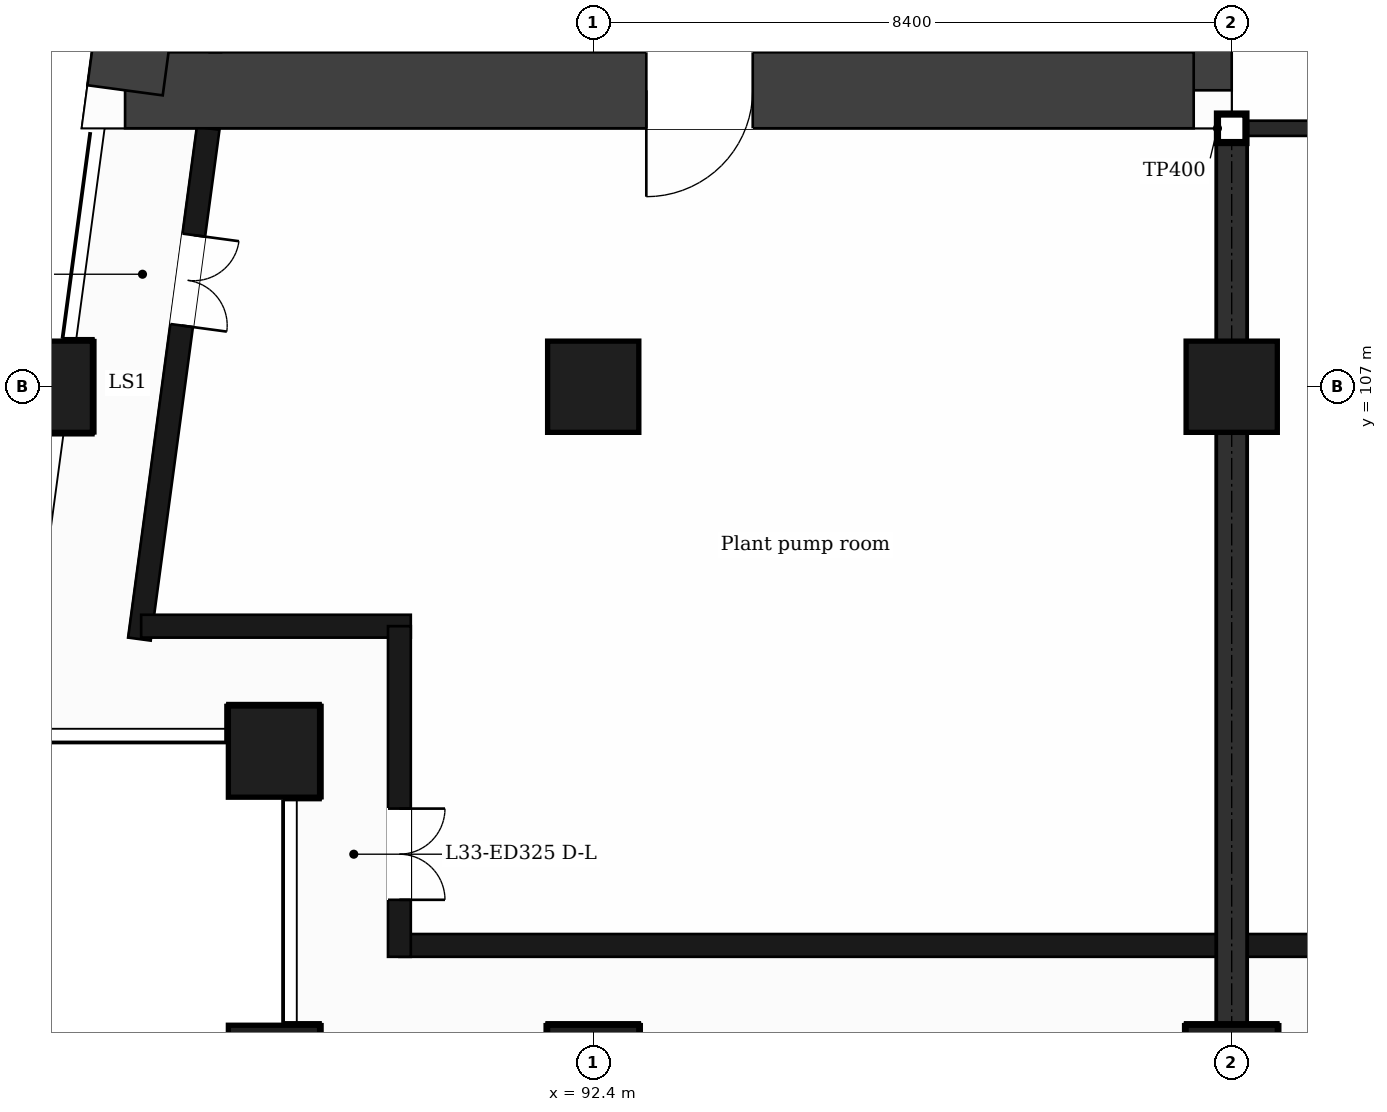
"""IFC4 building model, lengths in metres.
Left out: names, types, materials, properties, quantities, classifications, styles, units other than length and angle.
Written with IfcOpenShell. Run it as: python <this file> out.ifc"""

import sys

from ifc_helpers import new_model, si_unit, direction, frame, frame_2d, origin, origin_2d, place, context, subcontext, project, spatial, rectangle, extrude, element, fill, save


model = new_model("IFC4")
c1 = context("Model", 3, precision=1e-05, world=origin(), true_north=direction((0.0, 1.0)))
c2 = subcontext(c1, "Body", "Model", "MODEL_VIEW")
j1 = project(units=[si_unit("LENGTHUNIT", "METRE"), si_unit("PLANEANGLEUNIT", "RADIAN")], contexts=[c1])
p1 = place(None, origin())
s1 = spatial("IfcSite", under=j1, at=p1, CompositionType="ELEMENT")
p2 = place(p1, origin())
s2 = spatial("IfcBuilding", under=s1, at=p2, CompositionType="ELEMENT")
p3 = place(p2, frame((0.0, 0.0, 142.8)))
s3 = spatial("IfcBuildingStorey", under=s2, at=p3, CompositionType="ELEMENT", Elevation=142.8)
p4 = place(p3, frame((100.3, 131.9, 0.0), z_axis=(0.0, 0.0, 1.0), x_axis=(0.0, -1.0, 0.0)))
e1 = element("IfcWall", 1, at=p4, inside=s3, PredefinedType="SHEAR", context=c2, shape_type="SweptSolid", body=[
    extrude(rectangle(XDim=21.0, YDim=1.0, at=frame_2d((10.5, 0.0))), origin(), (0.0, 0.0, 1.0), 5.0),
])
p5 = place(p4, frame((18.7, 0.0, 0.0)))
e2 = element("IfcOpeningElement", 2, at=p5, cuts=e1, PredefinedType="OPENING", context=c2, shape_type="SweptSolid", body=[
    extrude(rectangle(XDim=1.2, YDim=2.1, at=frame_2d((0.6, 1.05))), frame((0.0, 0.51, 0.0), z_axis=(0.0, -1.0, 0.0), x_axis=(1.0, 0.0, 0.0)), (0.0, 0.0, 1.0), 1.02),
])
p6 = place(p4, frame((7.75, 0.0, 0.0)))
e3 = element("IfcOpeningElement", 3, at=p6, cuts=e1, PredefinedType="OPENING", context=c2, shape_type="SweptSolid", body=[
    extrude(rectangle(XDim=1.4, YDim=2.1, at=frame_2d((0.7, 1.05))), frame((0.0, 0.51, 0.0), z_axis=(0.0, -1.0, 0.0), x_axis=(1.0, 0.0, 0.0)), (0.0, 0.0, 1.0), 1.02),
])
p7 = place(p3, frame((100.3, 110.9, 0.0), z_axis=(0.0, 0.0, 1.0), x_axis=(-1.0, 0.0, 0.0)))
e4 = element("IfcWall", 4, at=p7, inside=s3, PredefinedType="SHEAR", context=c2, shape_type="SweptSolid", body=[
    extrude(rectangle(XDim=14.059, YDim=1.0, at=frame_2d((7.03, 0.0))), origin(), (0.0, 0.0, 1.0), 5.0),
])
p8 = place(p7, frame((5.802, 0.0, 0.0)))
e5 = element("IfcOpeningElement", 5, at=p8, cuts=e4, PredefinedType="OPENING", context=c2, shape_type="SweptSolid", body=[
    extrude(rectangle(XDim=1.4, YDim=2.1, at=frame_2d((0.7, 1.05))), frame((0.0, 0.51, 0.0), z_axis=(0.0, -1.0, 0.0), x_axis=(1.0, 0.0, 0.0)), (0.0, 0.0, 1.0), 1.02),
])
p9 = place(p3, frame((86.241, 110.9, 0.0), z_axis=(0.0, 0.0, 1.0), x_axis=(0.133411141623, 0.991060778808, 0.0)))
e6 = element("IfcWall", 6, at=p9, inside=s3, PredefinedType="SHEAR", context=c2, shape_type="SweptSolid", body=[
    extrude(rectangle(XDim=21.189, YDim=1.0, at=frame_2d((10.595, 0.0))), origin(), (0.0, 0.0, 1.0), 5.0),
])
for number, where, z_axis, x_axis in (
    (7, (92.4, 98.0, 0.0), (0.0, 0.0, 1.0), (1.0, 0.0, 0.0)),
    (8, (100.8, 98.0, 0.0), (0.0, 0.0, 1.0), (1.0, 0.0, 0.0)),
    (9, (88.2, 98.0, 0.0), (0.0, 0.0, 1.0), (1.0, 0.0, 0.0)),
    (10, (88.2, 102.2, 0.0), (0.0, 0.0, 1.0), (1.0, 0.0, 0.0)),
    (11, (92.4, 107.0, 0.0), (0.0, 0.0, 1.0), (1.0, 0.0, 0.0)),
    (12, (100.8, 107.0, 0.0), (0.0, 0.0, 1.0), (1.0, 0.0, 0.0)),
    (13, (85.211, 107.0, 0.0), (0.0, 0.0, 1.0), (1.0, 0.0, 0.0)),
):
    element("IfcColumn", number, at=place(p3, frame(where, z_axis=z_axis, x_axis=x_axis)), inside=s3, PredefinedType="COLUMN", context=c2, shape_type="SweptSolid", body=[
        extrude(rectangle(XDim=1.2, YDim=1.2, at=origin_2d()), origin(), (0.0, 0.0, 1.0), 5.0),
    ])
p10 = place(p3, frame((89.85, 99.65, 0.0), z_axis=(0.0, 0.0, 1.0), x_axis=(1.0, 0.0, 0.0)))
e14 = element("IfcWall", 14, at=p10, inside=s3, PredefinedType="SOLIDWALL", context=c2, shape_type="SweptSolid", body=[
    extrude(rectangle(XDim=47.25, YDim=0.3, at=frame_2d((23.625, 0.0))), origin(), (0.0, 0.0, 1.0), 4.68),
])
p11 = place(p10, frame((25.05, 0.0, 0.0)))
e15 = element("IfcOpeningElement", 15, at=p11, cuts=e14, PredefinedType="OPENING", context=c2, shape_type="SweptSolid", body=[
    extrude(rectangle(XDim=1.2, YDim=2.4, at=frame_2d((0.6, 1.2))), frame((0.0, 0.16, 0.0), z_axis=(0.0, -1.0, 0.0), x_axis=(1.0, 0.0, 0.0)), (0.0, 0.0, 1.0), 0.32),
])
p12 = place(p3, frame((87.334, 110.4, 0.0), z_axis=(0.0, 0.0, 1.0), x_axis=(-0.133437175554, -0.991057273915, 0.0)))
e16 = element("IfcWall", 16, at=p12, inside=s3, PredefinedType="SOLIDWALL", context=c2, shape_type="SweptSolid", body=[
    extrude(rectangle(XDim=6.781, YDim=0.3, at=frame_2d((3.39, 0.0))), origin(), (0.0, 0.0, 1.0), 4.68),
])
p13 = place(p12, frame((1.418, 0.0, 0.0)))
e17 = element("IfcOpeningElement", 17, at=p13, cuts=e16, PredefinedType="OPENING", context=c2, shape_type="SweptSolid", body=[
    extrude(rectangle(XDim=1.2, YDim=2.4, at=frame_2d((0.6, 1.2))), frame((0.0, 0.16, 0.0), z_axis=(0.0, -1.0, 0.0), x_axis=(1.0, 0.0, 0.0)), (0.0, 0.0, 1.0), 0.32),
])
p14 = place(p3, frame((86.452, 103.85, 0.0), z_axis=(0.0, 0.0, 1.0), x_axis=(1.0, 0.0, 0.0)))
e18 = element("IfcWall", 18, at=p14, inside=s3, PredefinedType="SOLIDWALL", context=c2, shape_type="SweptSolid", body=[
    extrude(rectangle(XDim=3.548, YDim=0.3, at=frame_2d((1.774, 0.0))), origin(), (0.0, 0.0, 1.0), 4.68),
])
p15 = place(p3, frame((89.85, 103.85, 0.0), z_axis=(0.0, 0.0, 1.0), x_axis=(0.0, -1.0, 0.0)))
e19 = element("IfcWall", 19, at=p15, inside=s3, PredefinedType="SOLIDWALL", context=c2, shape_type="SweptSolid", body=[
    extrude(rectangle(XDim=4.35, YDim=0.3, at=frame_2d((2.175, 0.0))), origin(), (0.0, 0.0, 1.0), 4.68),
])
p16 = place(p15, frame((2.4, 0.0, 0.0)))
e20 = element("IfcOpeningElement", 20, at=p16, cuts=e19, PredefinedType="OPENING", context=c2, shape_type="SweptSolid", body=[
    extrude(rectangle(XDim=1.2, YDim=2.4, at=frame_2d((0.6, 1.2))), frame((0.0, 0.16, 0.0), z_axis=(0.0, -1.0, 0.0), x_axis=(1.0, 0.0, 0.0)), (0.0, 0.0, 1.0), 0.32),
])
p17 = place(p3, frame((100.7, 110.4, 0.0), z_axis=(0.0, 0.0, 1.0), x_axis=(1.0, 0.0, 0.0)))
e21 = element("IfcWall", 21, at=p17, inside=s3, PredefinedType="PARTITIONING", context=c2, shape_type="SweptSolid", body=[
    extrude(rectangle(XDim=25.4, YDim=0.2, at=frame_2d((12.7, 0.0))), origin(), (0.0, 0.0, 1.0), 4.68),
])
p18 = place(p17, frame((20.5, 0.0, 0.0)))
e22 = element("IfcOpeningElement", 22, at=p18, cuts=e21, PredefinedType="OPENING", context=c2, shape_type="SweptSolid", body=[
    extrude(rectangle(XDim=1.2, YDim=2.1, at=frame_2d((0.6, 1.05))), frame((0.0, 0.11, 0.0), z_axis=(0.0, -1.0, 0.0), x_axis=(1.0, 0.0, 0.0)), (0.0, 0.0, 1.0), 0.22),
])
p19 = place(p3, frame((87.429, 111.4, 0.0), z_axis=(0.0, 0.0, 1.0), x_axis=(0.0, 1.0, 0.0)))
e23 = element("IfcWall", 23, at=p19, inside=s3, PredefinedType="PARTITIONING", context=c2, shape_type="SweptSolid", body=[
    extrude(rectangle(XDim=1.8, YDim=0.15, at=frame_2d((0.9, 0.0))), origin(), (0.0, 0.0, 1.0), 4.68),
])
p20 = place(p3, frame((100.8, 99.79, 0.0), z_axis=(0.0, 0.0, 1.0), x_axis=(0.0, 1.0, 0.0)))
e24 = element("IfcWall", 24, at=p20, inside=s3, PredefinedType="PARTITIONING", context=c2, shape_type="SweptSolid", body=[
    extrude(rectangle(XDim=10.51, YDim=0.2, at=frame_2d((5.255, 0.0))), origin(), (0.0, 0.0, 1.0), 4.68),
])
p21 = place(p13, origin())
e25 = element("IfcDoor", 25, at=p21, inside=s3, OperationType="DOUBLE_DOOR_SINGLE_SWING", PredefinedType="DOOR", context=c2, shape_type="SweptSolid", body=[
    extrude(rectangle(XDim=1.2, YDim=2.4, at=frame_2d((0.6, 1.2))), frame((0.0, 0.025, 0.0), z_axis=(0.0, -1.0, 0.0), x_axis=(1.0, 0.0, 0.0)), (0.0, 0.0, 1.0), 0.05),
])
fill(e17, e25)
p22 = place(p16, origin())
e26 = element("IfcDoor", 26, at=p22, inside=s3, OperationType="DOUBLE_DOOR_SINGLE_SWING", PredefinedType="DOOR", context=c2, shape_type="SweptSolid", body=[
    extrude(rectangle(XDim=1.2, YDim=2.4, at=frame_2d((0.6, 1.2))), frame((0.0, 0.025, 0.0), z_axis=(0.0, -1.0, 0.0), x_axis=(1.0, 0.0, 0.0)), (0.0, 0.0, 1.0), 0.05),
])
fill(e20, e26)
p23 = place(p8, origin())
e27 = element("IfcDoor", 27, at=p23, inside=s3, OperationType="SINGLE_SWING_RIGHT", PredefinedType="DOOR", context=c2, shape_type="SweptSolid", body=[
    extrude(rectangle(XDim=1.4, YDim=2.1, at=frame_2d((0.7, 1.05))), frame((0.0, 0.025, 0.0), z_axis=(0.0, -1.0, 0.0), x_axis=(1.0, 0.0, 0.0)), (0.0, 0.0, 1.0), 0.05),
])
fill(e5, e27)
save(model, sys.argv[1])
